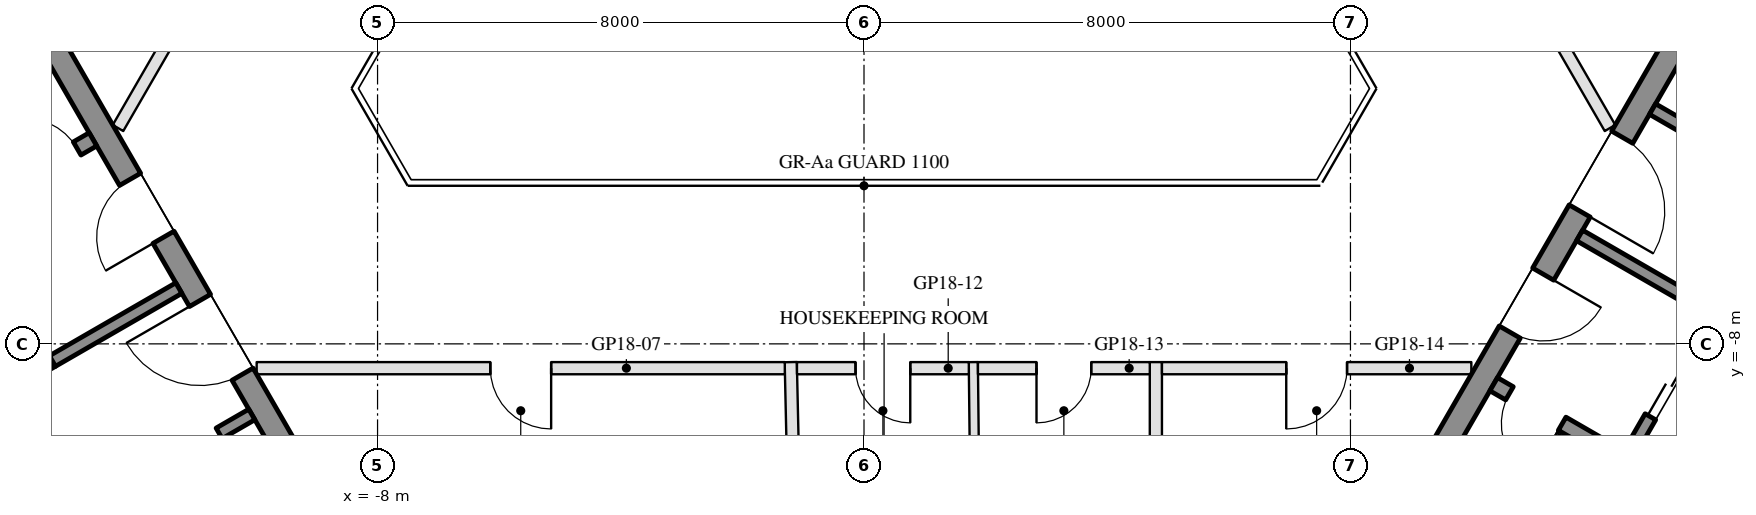
"""IFC4 building model, lengths in metres.
Left out: names, types, materials, properties, quantities, classifications, styles, units other than length and angle.
Written with IfcOpenShell. Run it as: python <this file> out.ifc"""

import sys

from ifc_helpers import new_model, si_unit, direction, frame, frame_2d, origin, place, context, subcontext, project, spatial, rectangle, extrude, element, fill, save


model = new_model("IFC4")
c1 = context("Model", 3, precision=1e-05, world=origin(), true_north=direction((0.0, 1.0)))
c2 = subcontext(c1, "Body", "Model", "MODEL_VIEW")
j1 = project(units=[si_unit("LENGTHUNIT", "METRE"), si_unit("PLANEANGLEUNIT", "RADIAN")], contexts=[c1])
p1 = place(None, origin())
s1 = spatial("IfcSite", under=j1, at=p1, CompositionType="ELEMENT")
p2 = place(p1, origin())
s2 = spatial("IfcBuilding", under=s1, at=p2, CompositionType="ELEMENT")
p3 = place(p2, frame((0.0, 0.0, 191.0)))
s3 = spatial("IfcBuildingStorey", under=s2, at=p3, CompositionType="ELEMENT", Elevation=191.0)
p4 = place(p3, frame((-13.845, -2.22, 0.0), z_axis=(0.0, 0.0, 1.0), x_axis=(0.500004234368, -0.866022959057, 0.0)))
e1 = element("IfcWall", 1, at=p4, inside=s3, PredefinedType="SHEAR", context=c2, shape_type="SweptSolid", body=[
    extrude(rectangle(XDim=10.0, YDim=0.4, at=frame_2d((5.0, 0.0))), origin(), (0.0, 0.0, 1.0), 3.5),
])
p5 = place(p4, frame((3.55, 0.0, 0.0)))
e2 = element("IfcOpeningElement", 2, at=p5, cuts=e1, PredefinedType="OPENING", context=c2, shape_type="SweptSolid", body=[
    extrude(rectangle(XDim=1.1, YDim=2.1, at=frame_2d((0.55, 1.05))), frame((0.0, 0.21, 0.0), z_axis=(0.0, -1.0, 0.0), x_axis=(1.0, 0.0, 0.0)), (0.0, 0.0, 1.0), 0.42),
])
p6 = place(p4, frame((5.85, 0.0, 0.0)))
e3 = element("IfcOpeningElement", 3, at=p6, cuts=e1, PredefinedType="OPENING", context=c2, shape_type="SweptSolid", body=[
    extrude(rectangle(XDim=1.4, YDim=2.1, at=frame_2d((0.7, 1.05))), frame((0.0, 0.21, 0.0), z_axis=(0.0, -1.0, 0.0), x_axis=(1.0, 0.0, 0.0)), (0.0, 0.0, 1.0), 0.42),
])
p7 = place(p3, frame((-12.681, -4.636, 0.0), z_axis=(0.0, 0.0, 1.0), x_axis=(-0.866021702275, -0.500006411147, 0.0)))
e4 = element("IfcWall", 4, at=p7, inside=s3, PredefinedType="SHEAR", context=c2, shape_type="SweptSolid", body=[
    extrude(rectangle(XDim=6.45, YDim=0.25, at=frame_2d((3.225, 0.0))), origin(), (0.0, 0.0, 1.0), 3.5),
])
p8 = place(p7, frame((0.3, 0.0, 0.0)))
e5 = element("IfcOpeningElement", 5, at=p8, cuts=e4, PredefinedType="OPENING", context=c2, shape_type="SweptSolid", body=[
    extrude(rectangle(XDim=1.0, YDim=2.1, at=frame_2d((0.5, 1.05))), frame((0.0, 0.135, 0.0), z_axis=(0.0, -1.0, 0.0), x_axis=(1.0, 0.0, 0.0)), (0.0, 0.0, 1.0), 0.27),
])
p9 = place(p3, frame((-14.783, -5.995, 0.0), z_axis=(0.0, 0.0, 1.0), x_axis=(0.49994636267, -0.866056369097, 0.0)))
e6 = element("IfcWall", 6, at=p9, inside=s3, PredefinedType="SHEAR", context=c2, shape_type="SweptSolid", body=[
    extrude(rectangle(XDim=2.8, YDim=0.2, at=frame_2d((1.4, 0.0))), origin(), (0.0, 0.0, 1.0), 3.5),
])
p10 = place(p9, frame((0.7, 0.0, 0.0)))
e7 = element("IfcOpeningElement", 7, at=p10, cuts=e6, PredefinedType="OPENING", context=c2, shape_type="SweptSolid", body=[
    extrude(rectangle(XDim=1.2, YDim=2.1, at=frame_2d((0.6, 1.05))), frame((0.0, 0.11, 0.0), z_axis=(0.0, -1.0, 0.0), x_axis=(1.0, 0.0, 0.0)), (0.0, 0.0, 1.0), 0.22),
])
p11 = place(p3, frame((-11.268, -7.083, 0.0), z_axis=(0.0, 0.0, 1.0), x_axis=(-0.866050077142, -0.499957262057, 0.0)))
e8 = element("IfcWall", 8, at=p11, inside=s3, PredefinedType="SHEAR", context=c2, shape_type="SweptSolid", body=[
    extrude(rectangle(XDim=2.4, YDim=0.2, at=frame_2d((1.2, 0.0))), origin(), (0.0, 0.0, 1.0), 3.5),
])
p12 = place(p3, frame((-10.068, -9.162, 0.0), z_axis=(0.0, 0.0, 1.0), x_axis=(-0.866032725843, -0.499987317609, 0.0)))
e9 = element("IfcWall", 9, at=p12, inside=s3, PredefinedType="SHEAR", context=c2, shape_type="SweptSolid", body=[
    extrude(rectangle(XDim=10.16, YDim=0.2, at=frame_2d((5.08, 0.0))), origin(), (0.0, 0.0, 1.0), 3.5),
])
p13 = place(p12, frame((0.62, 0.0, 0.0)))
e10 = element("IfcOpeningElement", 10, at=p13, cuts=e9, PredefinedType="OPENING", context=c2, shape_type="SweptSolid", body=[
    extrude(rectangle(XDim=1.1, YDim=2.1, at=frame_2d((0.55, 1.05))), frame((0.0, 0.11, 0.0), z_axis=(0.0, -1.0, 0.0), x_axis=(1.0, 0.0, 0.0)), (0.0, 0.0, 1.0), 0.22),
])
p14 = place(p12, frame((3.16, 0.0, 0.0)))
e11 = element("IfcOpeningElement", 11, at=p14, cuts=e9, PredefinedType="OPENING", context=c2, shape_type="SweptSolid", body=[
    extrude(rectangle(XDim=1.1, YDim=2.1, at=frame_2d((0.55, 1.05))), frame((0.0, 0.11, 0.0), z_axis=(0.0, -1.0, 0.0), x_axis=(1.0, 0.0, 0.0)), (0.0, 0.0, 1.0), 0.22),
])
p15 = place(p12, frame((5.7, 0.0, 0.0)))
e12 = element("IfcOpeningElement", 12, at=p15, cuts=e9, PredefinedType="OPENING", context=c2, shape_type="SweptSolid", body=[
    extrude(rectangle(XDim=1.1, YDim=2.1, at=frame_2d((0.55, 1.05))), frame((0.0, 0.11, 0.0), z_axis=(0.0, -1.0, 0.0), x_axis=(1.0, 0.0, 0.0)), (0.0, 0.0, 1.0), 0.22),
])
p16 = place(p12, frame((8.24, 0.0, 0.0)))
e13 = element("IfcOpeningElement", 13, at=p16, cuts=e9, PredefinedType="OPENING", context=c2, shape_type="SweptSolid", body=[
    extrude(rectangle(XDim=1.1, YDim=2.1, at=frame_2d((0.55, 1.05))), frame((0.0, 0.11, 0.0), z_axis=(0.0, -1.0, 0.0), x_axis=(1.0, 0.0, 0.0)), (0.0, 0.0, 1.0), 0.22),
])
p17 = place(p3, frame((8.845, -10.88, 0.0), z_axis=(0.0, 0.0, 1.0), x_axis=(0.500004234368, 0.866022959057, 0.0)))
e14 = element("IfcWall", 14, at=p17, inside=s3, PredefinedType="SHEAR", context=c2, shape_type="SweptSolid", body=[
    extrude(rectangle(XDim=10.0, YDim=0.4, at=frame_2d((5.0, 0.0))), origin(), (0.0, 0.0, 1.0), 3.5),
])
p18 = place(p17, frame((3.55, 0.0, 0.0)))
e15 = element("IfcOpeningElement", 15, at=p18, cuts=e14, PredefinedType="OPENING", context=c2, shape_type="SweptSolid", body=[
    extrude(rectangle(XDim=1.1, YDim=2.1, at=frame_2d((0.55, 1.05))), frame((0.0, 0.21, 0.0), z_axis=(0.0, -1.0, 0.0), x_axis=(1.0, 0.0, 0.0)), (0.0, 0.0, 1.0), 0.42),
])
p19 = place(p17, frame((5.85, 0.0, 0.0)))
e16 = element("IfcOpeningElement", 16, at=p19, cuts=e14, PredefinedType="OPENING", context=c2, shape_type="SweptSolid", body=[
    extrude(rectangle(XDim=1.4, YDim=2.1, at=frame_2d((0.7, 1.05))), frame((0.0, 0.21, 0.0), z_axis=(0.0, -1.0, 0.0), x_axis=(1.0, 0.0, 0.0)), (0.0, 0.0, 1.0), 0.42),
])
p20 = place(p3, frame((10.356, -8.664, 0.0), z_axis=(0.0, 0.0, 1.0), x_axis=(0.866028629588, -0.499994412703, 0.0)))
e17 = element("IfcWall", 17, at=p20, inside=s3, PredefinedType="SHEAR", context=c2, shape_type="SweptSolid", body=[
    extrude(rectangle(XDim=6.45, YDim=0.25, at=frame_2d((3.225, 0.0))), origin(), (0.0, 0.0, 1.0), 3.5),
])
p21 = place(p20, frame((0.3, 0.0, 0.0)))
e18 = element("IfcOpeningElement", 18, at=p21, cuts=e17, PredefinedType="OPENING", context=c2, shape_type="SweptSolid", body=[
    extrude(rectangle(XDim=1.0, YDim=2.1, at=frame_2d((0.5, 1.05))), frame((0.0, 0.135, 0.0), z_axis=(0.0, -1.0, 0.0), x_axis=(1.0, 0.0, 0.0)), (0.0, 0.0, 1.0), 0.27),
])
p22 = place(p3, frame((12.583, -9.805, 0.0), z_axis=(0.0, 0.0, 1.0), x_axis=(0.49994636267, 0.866056369097, 0.0)))
e19 = element("IfcWall", 19, at=p22, inside=s3, PredefinedType="SHEAR", context=c2, shape_type="SweptSolid", body=[
    extrude(rectangle(XDim=2.8, YDim=0.2, at=frame_2d((1.4, 0.0))), origin(), (0.0, 0.0, 1.0), 3.5),
])
p23 = place(p22, frame((0.7, 0.0, 0.0)))
e20 = element("IfcOpeningElement", 20, at=p23, cuts=e19, PredefinedType="OPENING", context=c2, shape_type="SweptSolid", body=[
    extrude(rectangle(XDim=1.2, YDim=2.1, at=frame_2d((0.6, 1.05))), frame((0.0, 0.11, 0.0), z_axis=(0.0, -1.0, 0.0), x_axis=(1.0, 0.0, 0.0)), (0.0, 0.0, 1.0), 0.22),
])
p24 = place(p3, frame((11.768, -6.217, 0.0), z_axis=(0.0, 0.0, 1.0), x_axis=(0.866050077142, -0.499957262057, 0.0)))
e21 = element("IfcWall", 21, at=p24, inside=s3, PredefinedType="SHEAR", context=c2, shape_type="SweptSolid", body=[
    extrude(rectangle(XDim=2.4, YDim=0.2, at=frame_2d((1.2, 0.0))), origin(), (0.0, 0.0, 1.0), 3.5),
])
p25 = place(p3, frame((12.968, -4.138, 0.0), z_axis=(0.0, 0.0, 1.0), x_axis=(0.866028328073, -0.49999493495, 0.0)))
e22 = element("IfcWall", 22, at=p25, inside=s3, PredefinedType="SHEAR", context=c2, shape_type="SweptSolid", body=[
    extrude(rectangle(XDim=10.16, YDim=0.2, at=frame_2d((5.08, 0.0))), origin(), (0.0, 0.0, 1.0), 3.5),
])
p26 = place(p25, frame((1.99, 0.0, 0.0)))
e23 = element("IfcOpeningElement", 23, at=p26, cuts=e22, PredefinedType="OPENING", context=c2, shape_type="SweptSolid", body=[
    extrude(rectangle(XDim=0.9, YDim=2.1, at=frame_2d((0.45, 1.05))), frame((0.0, 0.11, 0.0), z_axis=(0.0, -1.0, 0.0), x_axis=(1.0, 0.0, 0.0)), (0.0, 0.0, 1.0), 0.22),
])
p27 = place(p25, frame((7.07, 0.0, 0.0)))
e24 = element("IfcOpeningElement", 24, at=p27, cuts=e22, PredefinedType="OPENING", context=c2, shape_type="SweptSolid", body=[
    extrude(rectangle(XDim=0.9, YDim=2.1, at=frame_2d((0.45, 1.05))), frame((0.0, 0.11, 0.0), z_axis=(0.0, -1.0, 0.0), x_axis=(1.0, 0.0, 0.0)), (0.0, 0.0, 1.0), 0.22),
])
p28 = place(p3, frame((-0.98, -18.38, 0.0), z_axis=(0.0, 0.0, 1.0), x_axis=(-0.022277513004, 0.999751825412, 0.0)))
e25 = element("IfcWall", 25, at=p28, inside=s3, PredefinedType="PARTITIONING", context=c2, shape_type="SweptSolid", body=[
    extrude(rectangle(XDim=10.082, YDim=0.2, at=frame_2d((5.041, 0.0))), origin(), (0.0, 0.0, 1.0), 3.06),
])
p29 = place(p3, frame((4.8, -19.28, 0.0), z_axis=(0.0, 0.0, 1.0), x_axis=(0.0, 1.0, 0.0)))
e26 = element("IfcWall", 26, at=p29, inside=s3, PredefinedType="PARTITIONING", context=c2, shape_type="SweptSolid", body=[
    extrude(rectangle(XDim=10.98, YDim=0.2, at=frame_2d((5.49, 0.0))), origin(), (0.0, 0.0, 1.0), 3.06),
])
p30 = place(p3, frame((-1.302, -8.4, 0.0), z_axis=(0.0, 0.0, 1.0), x_axis=(-1.0, 0.0, 0.0)))
e27 = element("IfcWall", 27, at=p30, inside=s3, PredefinedType="PARTITIONING", context=c2, shape_type="SweptSolid", body=[
    extrude(rectangle(XDim=8.686, YDim=0.2, at=frame_2d((4.343, 0.0))), origin(), (0.0, 0.0, 1.0), 2.95),
])
p31 = place(p30, frame((3.843, 0.0, 0.0)))
e28 = element("IfcOpeningElement", 28, at=p31, cuts=e27, PredefinedType="OPENING", context=c2, shape_type="SweptSolid", body=[
    extrude(rectangle(XDim=1.0, YDim=2.1, at=frame_2d((0.5, 1.05))), frame((0.0, 0.11, 0.0), z_axis=(0.0, -1.0, 0.0), x_axis=(1.0, 0.0, 0.0)), (0.0, 0.0, 1.0), 0.22),
])
p32 = place(p3, frame((1.92, -19.28, 0.0), z_axis=(0.0, 0.0, 1.0), x_axis=(-0.011116847578, 0.999938205941, 0.0)))
e29 = element("IfcWall", 29, at=p32, inside=s3, PredefinedType="PARTITIONING", context=c2, shape_type="SweptSolid", body=[
    extrude(rectangle(XDim=10.981, YDim=0.15, at=frame_2d((5.49, 0.0))), origin(), (0.0, 0.0, 1.0), 3.06),
])
p33 = place(p3, frame((1.724, -8.4, 0.0), z_axis=(0.0, 0.0, 1.0), x_axis=(-1.0, 0.0, 0.0)))
e30 = element("IfcWall", 30, at=p33, inside=s3, PredefinedType="PARTITIONING", context=c2, shape_type="SweptSolid", body=[
    extrude(rectangle(XDim=2.826, YDim=0.2, at=frame_2d((1.413, 0.0))), origin(), (0.0, 0.0, 1.0), 2.95),
])
p34 = place(p33, frame((0.963, 0.0, 0.0)))
e31 = element("IfcOpeningElement", 31, at=p34, cuts=e30, PredefinedType="OPENING", context=c2, shape_type="SweptSolid", body=[
    extrude(rectangle(XDim=0.9, YDim=2.1, at=frame_2d((0.45, 1.05))), frame((0.0, 0.11, 0.0), z_axis=(0.0, -1.0, 0.0), x_axis=(1.0, 0.0, 0.0)), (0.0, 0.0, 1.0), 0.22),
])
p35 = place(p3, frame((4.7, -8.4, 0.0), z_axis=(0.0, 0.0, 1.0), x_axis=(-1.0, 0.0, 0.0)))
e32 = element("IfcWall", 32, at=p35, inside=s3, PredefinedType="PARTITIONING", context=c2, shape_type="SweptSolid", body=[
    extrude(rectangle(XDim=2.826, YDim=0.2, at=frame_2d((1.413, 0.0))), origin(), (0.0, 0.0, 1.0), 2.95),
])
p36 = place(p35, frame((0.963, 0.0, 0.0)))
e33 = element("IfcOpeningElement", 33, at=p36, cuts=e32, PredefinedType="OPENING", context=c2, shape_type="SweptSolid", body=[
    extrude(rectangle(XDim=0.9, YDim=2.1, at=frame_2d((0.45, 1.05))), frame((0.0, 0.11, 0.0), z_axis=(0.0, -1.0, 0.0), x_axis=(1.0, 0.0, 0.0)), (0.0, 0.0, 1.0), 0.22),
])
p37 = place(p3, frame((9.988, -8.4, 0.0), z_axis=(0.0, 0.0, 1.0), x_axis=(-1.0, 0.0, 0.0)))
e34 = element("IfcWall", 34, at=p37, inside=s3, PredefinedType="PARTITIONING", context=c2, shape_type="SweptSolid", body=[
    extrude(rectangle(XDim=5.088, YDim=0.2, at=frame_2d((2.544, 0.0))), origin(), (0.0, 0.0, 1.0), 2.95),
])
p38 = place(p37, frame((2.044, 0.0, 0.0)))
e35 = element("IfcOpeningElement", 35, at=p38, cuts=e34, PredefinedType="OPENING", context=c2, shape_type="SweptSolid", body=[
    extrude(rectangle(XDim=1.0, YDim=2.1, at=frame_2d((0.5, 1.05))), frame((0.0, 0.11, 0.0), z_axis=(0.0, -1.0, 0.0), x_axis=(1.0, 0.0, 0.0)), (0.0, 0.0, 1.0), 0.22),
])
p39 = place(p3, frame((9.325, 0.649, 0.0), z_axis=(0.0, 0.0, 1.0), x_axis=(0.500032331163, -0.866006736574, 0.0)))
e36 = element("IfcWall", 36, at=p39, inside=s3, PredefinedType="PARTITIONING", context=c2, shape_type="SweptSolid", body=[
    extrude(rectangle(XDim=5.888, YDim=0.2, at=frame_2d((2.944, 0.0))), origin(), (0.0, 0.0, 1.0), 2.95),
])
p40 = place(p39, frame((2.444, 0.0, 0.0)))
e37 = element("IfcOpeningElement", 37, at=p40, cuts=e36, PredefinedType="OPENING", context=c2, shape_type="SweptSolid", body=[
    extrude(rectangle(XDim=1.0, YDim=2.1, at=frame_2d((0.5, 1.05))), frame((0.0, 0.11, 0.0), z_axis=(0.0, -1.0, 0.0), x_axis=(1.0, 0.0, 0.0)), (0.0, 0.0, 1.0), 0.22),
])
p41 = place(p3, frame((-12.269, -4.45, 0.0), z_axis=(0.0, 0.0, 1.0), x_axis=(0.500026884667, 0.866009881359, 0.0)))
e38 = element("IfcWall", 38, at=p41, inside=s3, PredefinedType="PARTITIONING", context=c2, shape_type="SweptSolid", body=[
    extrude(rectangle(XDim=5.484, YDim=0.2, at=frame_2d((2.742, 0.0))), origin(), (0.0, 0.0, 1.0), 2.95),
])
p42 = place(p41, frame((2.242, 0.0, 0.0)))
e39 = element("IfcOpeningElement", 39, at=p42, cuts=e38, PredefinedType="OPENING", context=c2, shape_type="SweptSolid", body=[
    extrude(rectangle(XDim=1.0, YDim=2.1, at=frame_2d((0.5, 1.05))), frame((0.0, 0.11, 0.0), z_axis=(0.0, -1.0, 0.0), x_axis=(1.0, 0.0, 0.0)), (0.0, 0.0, 1.0), 0.22),
])
p43 = place(p13, origin())
e40 = element("IfcDoor", 40, at=p43, inside=s3, OperationType="DOUBLE_DOOR_SLIDING", PredefinedType="DOOR", context=c2, shape_type="SweptSolid", body=[
    extrude(rectangle(XDim=1.1, YDim=2.1, at=frame_2d((0.55, 1.05))), frame((0.0, 0.025, 0.0), z_axis=(0.0, -1.0, 0.0), x_axis=(1.0, 0.0, 0.0)), (0.0, 0.0, 1.0), 0.05),
])
fill(e10, e40)
p44 = place(p5, frame((1.1, 0.0, 0.0), z_axis=(0.0, 0.0, 1.0), x_axis=(-1.0, 0.0, 0.0)))
e41 = element("IfcDoor", 41, at=p44, inside=s3, OperationType="SINGLE_SWING_LEFT", PredefinedType="DOOR", context=c2, shape_type="SweptSolid", body=[
    extrude(rectangle(XDim=1.1, YDim=2.1, at=frame_2d((0.55, 1.05))), frame((0.0, 0.025, 0.0), z_axis=(0.0, -1.0, 0.0), x_axis=(1.0, 0.0, 0.0)), (0.0, 0.0, 1.0), 0.05),
])
fill(e2, e41)
p45 = place(p6, frame((1.4, 0.0, 0.0), z_axis=(0.0, 0.0, 1.0), x_axis=(-1.0, 0.0, 0.0)))
e42 = element("IfcDoor", 42, at=p45, inside=s3, OperationType="DOUBLE_DOOR_SINGLE_SWING", PredefinedType="DOOR", context=c2, shape_type="SweptSolid", body=[
    extrude(rectangle(XDim=1.4, YDim=2.1, at=frame_2d((0.7, 1.05))), frame((0.0, 0.025, 0.0), z_axis=(0.0, -1.0, 0.0), x_axis=(1.0, 0.0, 0.0)), (0.0, 0.0, 1.0), 0.05),
])
fill(e3, e42)
p46 = place(p8, frame((1.0, 0.0, 0.0), z_axis=(0.0, 0.0, 1.0), x_axis=(-1.0, 0.0, 0.0)))
e43 = element("IfcDoor", 43, at=p46, inside=s3, OperationType="SINGLE_SWING_LEFT", PredefinedType="DOOR", context=c2, shape_type="SweptSolid", body=[
    extrude(rectangle(XDim=1.0, YDim=2.1, at=frame_2d((0.5, 1.05))), frame((0.0, 0.025, 0.0), z_axis=(0.0, -1.0, 0.0), x_axis=(1.0, 0.0, 0.0)), (0.0, 0.0, 1.0), 0.05),
])
fill(e5, e43)
p47 = place(p23, origin())
e44 = element("IfcDoor", 44, at=p47, inside=s3, OperationType="DOUBLE_DOOR_SLIDING", PredefinedType="DOOR", context=c2, shape_type="SweptSolid", body=[
    extrude(rectangle(XDim=1.2, YDim=2.1, at=frame_2d((0.6, 1.05))), frame((0.0, 0.025, 0.0), z_axis=(0.0, -1.0, 0.0), x_axis=(1.0, 0.0, 0.0)), (0.0, 0.0, 1.0), 0.05),
])
fill(e20, e44)
p48 = place(p18, frame((1.1, 0.0, 0.0), z_axis=(0.0, 0.0, 1.0), x_axis=(-1.0, 0.0, 0.0)))
e45 = element("IfcDoor", 45, at=p48, inside=s3, OperationType="SINGLE_SWING_LEFT", PredefinedType="DOOR", context=c2, shape_type="SweptSolid", body=[
    extrude(rectangle(XDim=1.1, YDim=2.1, at=frame_2d((0.55, 1.05))), frame((0.0, 0.025, 0.0), z_axis=(0.0, -1.0, 0.0), x_axis=(1.0, 0.0, 0.0)), (0.0, 0.0, 1.0), 0.05),
])
fill(e15, e45)
p49 = place(p19, frame((1.4, 0.0, 0.0), z_axis=(0.0, 0.0, 1.0), x_axis=(-1.0, 0.0, 0.0)))
e46 = element("IfcDoor", 46, at=p49, inside=s3, OperationType="DOUBLE_DOOR_SINGLE_SWING", PredefinedType="DOOR", context=c2, shape_type="SweptSolid", body=[
    extrude(rectangle(XDim=1.4, YDim=2.1, at=frame_2d((0.7, 1.05))), frame((0.0, 0.025, 0.0), z_axis=(0.0, -1.0, 0.0), x_axis=(1.0, 0.0, 0.0)), (0.0, 0.0, 1.0), 0.05),
])
fill(e16, e46)
p50 = place(p21, frame((1.0, 0.0, 0.0), z_axis=(0.0, 0.0, 1.0), x_axis=(-1.0, 0.0, 0.0)))
e47 = element("IfcDoor", 47, at=p50, inside=s3, OperationType="SINGLE_SWING_LEFT", PredefinedType="DOOR", context=c2, shape_type="SweptSolid", body=[
    extrude(rectangle(XDim=1.0, YDim=2.1, at=frame_2d((0.5, 1.05))), frame((0.0, 0.025, 0.0), z_axis=(0.0, -1.0, 0.0), x_axis=(1.0, 0.0, 0.0)), (0.0, 0.0, 1.0), 0.05),
])
fill(e18, e47)
p51 = place(p31, origin())
e48 = element("IfcDoor", 48, at=p51, inside=s3, OperationType="SINGLE_SWING_LEFT", PredefinedType="DOOR", context=c2, shape_type="SweptSolid", body=[
    extrude(rectangle(XDim=1.0, YDim=2.1, at=frame_2d((0.5, 1.05))), frame((0.0, 0.025, 0.0), z_axis=(0.0, -1.0, 0.0), x_axis=(1.0, 0.0, 0.0)), (0.0, 0.0, 1.0), 0.05),
])
fill(e28, e48)
p52 = place(p34, origin())
e49 = element("IfcDoor", 49, at=p52, inside=s3, OperationType="SINGLE_SWING_LEFT", PredefinedType="DOOR", context=c2, shape_type="SweptSolid", body=[
    extrude(rectangle(XDim=0.9, YDim=2.1, at=frame_2d((0.45, 1.05))), frame((0.0, 0.025, 0.0), z_axis=(0.0, -1.0, 0.0), x_axis=(1.0, 0.0, 0.0)), (0.0, 0.0, 1.0), 0.05),
])
fill(e31, e49)
p53 = place(p36, origin())
e50 = element("IfcDoor", 50, at=p53, inside=s3, OperationType="SINGLE_SWING_RIGHT", PredefinedType="DOOR", context=c2, shape_type="SweptSolid", body=[
    extrude(rectangle(XDim=0.9, YDim=2.1, at=frame_2d((0.45, 1.05))), frame((0.0, 0.025, 0.0), z_axis=(0.0, -1.0, 0.0), x_axis=(1.0, 0.0, 0.0)), (0.0, 0.0, 1.0), 0.05),
])
fill(e33, e50)
p54 = place(p38, origin())
e51 = element("IfcDoor", 51, at=p54, inside=s3, OperationType="SINGLE_SWING_RIGHT", PredefinedType="DOOR", context=c2, shape_type="SweptSolid", body=[
    extrude(rectangle(XDim=1.0, YDim=2.1, at=frame_2d((0.5, 1.05))), frame((0.0, 0.025, 0.0), z_axis=(0.0, -1.0, 0.0), x_axis=(1.0, 0.0, 0.0)), (0.0, 0.0, 1.0), 0.05),
])
fill(e35, e51)
save(model, sys.argv[1])
